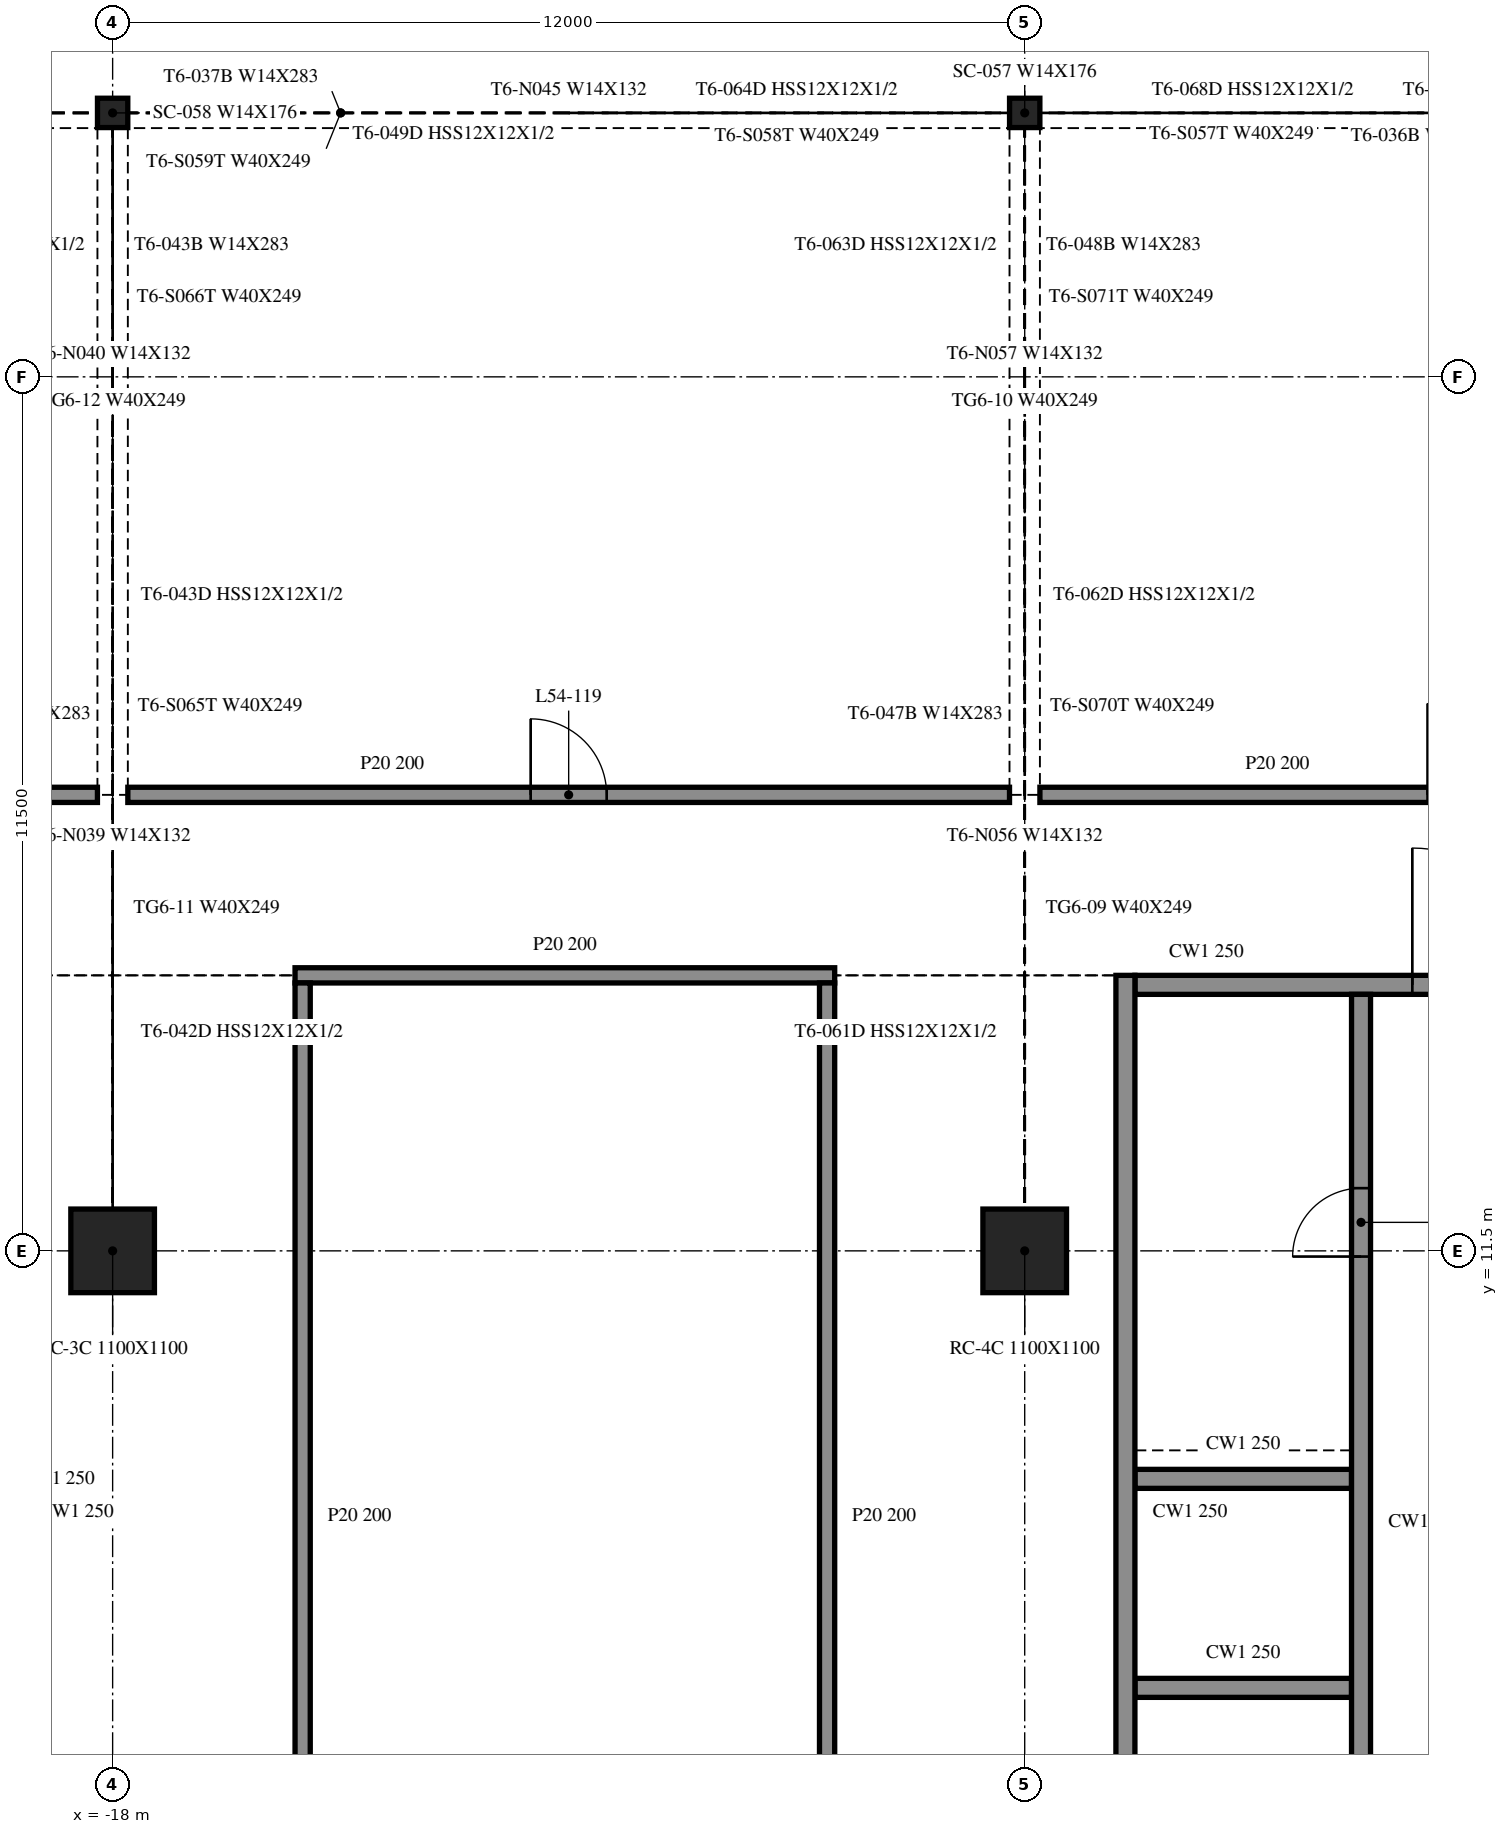
"""IFC4 building model, lengths in metres.
Left out: names, types, materials, properties, quantities, classifications, styles, units other than length and angle.
Written with IfcOpenShell. Run it as: python <this file> out.ifc"""

import sys

from ifc_helpers import new_model, si_unit, direction, frame, frame_2d, origin, origin_2d, place, context, subcontext, project, spatial, rectangle, i_section, extrude, element, fill, save


model = new_model("IFC4")
c1 = context("Model", 3, precision=1e-05, world=origin(), true_north=direction((0.0, 1.0)))
c2 = subcontext(c1, "Body", "Model", "MODEL_VIEW")
j1 = project(units=[si_unit("LENGTHUNIT", "METRE"), si_unit("PLANEANGLEUNIT", "RADIAN")], contexts=[c1])
p1 = place(None, origin())
s1 = spatial("IfcSite", under=j1, at=p1, CompositionType="ELEMENT")
p2 = place(p1, origin())
s2 = spatial("IfcBuilding", under=s1, at=p2, CompositionType="ELEMENT")
p3 = place(p2, frame((0.0, 0.0, 224.3)))
s3 = spatial("IfcBuildingStorey", under=s2, at=p3, CompositionType="ELEMENT", Elevation=224.3)
for number, where, z_axis, x_axis in (
    (1, (-18.0, 11.5, -0.4), (0.0, 0.0, 1.0), (1.0, 0.0, 0.0)),
    (2, (-6.0, 11.5, -0.4), (0.0, 0.0, 1.0), (1.0, 0.0, 0.0)),
):
    element("IfcColumn", number, at=place(p3, frame(where, z_axis=z_axis, x_axis=x_axis)), inside=s3, PredefinedType="COLUMN", context=c2, shape_type="SweptSolid", body=[
        extrude(rectangle(XDim=1.1, YDim=1.1, at=origin_2d()), origin(), (0.0, 0.0, 1.0), 4.36),
    ])
for number, where, z_axis, x_axis in (
    (3, (-6.0, 26.473, -0.4), (0.0, 0.0, 1.0), (1.0, 0.0, 0.0)),
    (4, (-18.0, 26.473, -0.4), (0.0, 0.0, 1.0), (1.0, 0.0, 0.0)),
):
    element("IfcColumn", number, at=place(p3, frame(where, z_axis=z_axis, x_axis=x_axis)), inside=s3, PredefinedType="COLUMN", context=c2, shape_type="SweptSolid", body=[
        extrude(i_section(OverallWidth=0.399, OverallDepth=0.386, WebThickness=0.021, FlangeThickness=0.033, at=origin_2d()), origin(), (0.0, 0.0, 1.0), 4.36),
    ])
p4 = place(p3, frame((-4.675, 15.125, 0.0), z_axis=(0.0, 0.0, 1.0), x_axis=(0.0, -1.0, 0.0)))
e5 = element("IfcWall", 5, at=p4, inside=s3, PredefinedType="SOLIDWALL", context=c2, shape_type="SweptSolid", body=[
    extrude(rectangle(XDim=24.25, YDim=0.25, at=frame_2d((12.125, 0.0))), origin(), (0.0, 0.0, 1.0), 3.96),
])
p5 = place(p3, frame((-4.55, 15.0, 0.0), z_axis=(0.0, 0.0, 1.0), x_axis=(1.0, 0.0, 0.0)))
e6 = element("IfcWall", 6, at=p5, inside=s3, PredefinedType="SOLIDWALL", context=c2, shape_type="SweptSolid", body=[
    extrude(rectangle(XDim=9.1, YDim=0.25, at=frame_2d((4.55, 0.0))), origin(), (0.0, 0.0, 1.0), 3.96),
])
p6 = place(p5, frame((3.65, 0.0, 0.0)))
e7 = element("IfcOpeningElement", 7, at=p6, cuts=e6, PredefinedType="OPENING", context=c2, shape_type="SweptSolid", body=[
    extrude(rectangle(XDim=1.8, YDim=2.1, at=frame_2d((0.9, 1.05))), frame((0.0, 0.135, 0.0), z_axis=(0.0, -1.0, 0.0), x_axis=(1.0, 0.0, 0.0)), (0.0, 0.0, 1.0), 0.27),
])
p7 = place(p3, frame((-1.575, -8.875, 0.0), z_axis=(0.0, 0.0, 1.0), x_axis=(0.0, 1.0, 0.0)))
e8 = element("IfcWall", 8, at=p7, inside=s3, PredefinedType="SOLIDWALL", context=c2, shape_type="SweptSolid", body=[
    extrude(rectangle(XDim=23.75, YDim=0.25, at=frame_2d((11.875, 0.0))), origin(), (0.0, 0.0, 1.0), 3.96),
])
p8 = place(p7, frame((0.712, 0.0, 0.0)))
e9 = element("IfcOpeningElement", 9, at=p8, cuts=e8, PredefinedType="OPENING", context=c2, shape_type="SweptSolid", body=[
    extrude(rectangle(XDim=0.9, YDim=2.1, at=frame_2d((0.45, 1.05))), frame((0.0, 0.135, 0.0), z_axis=(0.0, -1.0, 0.0), x_axis=(1.0, 0.0, 0.0)), (0.0, 0.0, 1.0), 0.27),
])
p9 = place(p7, frame((3.788, 0.0, 0.0)))
e10 = element("IfcOpeningElement", 10, at=p9, cuts=e8, PredefinedType="OPENING", context=c2, shape_type="SweptSolid", body=[
    extrude(rectangle(XDim=0.9, YDim=2.1, at=frame_2d((0.45, 1.05))), frame((0.0, 0.135, 0.0), z_axis=(0.0, -1.0, 0.0), x_axis=(1.0, 0.0, 0.0)), (0.0, 0.0, 1.0), 0.27),
])
p10 = place(p7, frame((20.3, 0.0, 0.0)))
e11 = element("IfcOpeningElement", 11, at=p10, cuts=e8, PredefinedType="OPENING", context=c2, shape_type="SweptSolid", body=[
    extrude(rectangle(XDim=0.9, YDim=2.1, at=frame_2d((0.45, 1.05))), frame((0.0, 0.135, 0.0), z_axis=(0.0, -1.0, 0.0), x_axis=(1.0, 0.0, 0.0)), (0.0, 0.0, 1.0), 0.27),
])
for number, where, z_axis, x_axis in (
    (12, (-4.55, 5.75, 0.0), (0.0, 0.0, 1.0), (1.0, 0.0, 0.0)),
    (13, (-4.55, 8.5, 0.0), (0.0, 0.0, 1.0), (1.0, 0.0, 0.0)),
):
    element("IfcWall", number, at=place(p3, frame(where, z_axis=z_axis, x_axis=x_axis)), inside=s3, PredefinedType="SOLIDWALL", context=c2, shape_type="SweptSolid", body=[
        extrude(rectangle(XDim=2.85, YDim=0.25, at=frame_2d((1.425, 0.0))), origin(), (0.0, 0.0, 1.0), 3.96),
    ])
p11 = place(p3, frame((-15.6, 15.125, 0.0), z_axis=(0.0, 0.0, 1.0), x_axis=(1.0, 0.0, 0.0)))
e14 = element("IfcWall", 14, at=p11, inside=s3, PredefinedType="PARTITIONING", context=c2, shape_type="SweptSolid", body=[
    extrude(rectangle(XDim=7.1, YDim=0.2, at=frame_2d((3.55, 0.0))), origin(), (0.0, 0.0, 1.0), 3.96),
])
p12 = place(p3, frame((-29.8, 17.5, 0.0), z_axis=(0.0, 0.0, 1.0), x_axis=(1.0, 0.0, 0.0)))
e15 = element("IfcWall", 15, at=p12, inside=s3, PredefinedType="PARTITIONING", context=c2, shape_type="SweptSolid", body=[
    extrude(rectangle(XDim=11.6, YDim=0.2, at=frame_2d((5.8, 0.0))), origin(), (0.0, 0.0, 1.0), 3.96),
])
p13 = place(p12, frame((5.3, 0.0, 0.0)))
e16 = element("IfcOpeningElement", 16, at=p13, cuts=e15, PredefinedType="OPENING", context=c2, shape_type="SweptSolid", body=[
    extrude(rectangle(XDim=1.0, YDim=2.1, at=frame_2d((0.5, 1.05))), frame((0.0, 0.11, 0.0), z_axis=(0.0, -1.0, 0.0), x_axis=(1.0, 0.0, 0.0)), (0.0, 0.0, 1.0), 0.22),
])
p14 = place(p3, frame((-17.8, 17.5, 0.0), z_axis=(0.0, 0.0, 1.0), x_axis=(1.0, 0.0, 0.0)))
e17 = element("IfcWall", 17, at=p14, inside=s3, PredefinedType="PARTITIONING", context=c2, shape_type="SweptSolid", body=[
    extrude(rectangle(XDim=11.6, YDim=0.2, at=frame_2d((5.8, 0.0))), origin(), (0.0, 0.0, 1.0), 3.96),
])
p15 = place(p14, frame((5.3, 0.0, 0.0)))
e18 = element("IfcOpeningElement", 18, at=p15, cuts=e17, PredefinedType="OPENING", context=c2, shape_type="SweptSolid", body=[
    extrude(rectangle(XDim=1.0, YDim=2.1, at=frame_2d((0.5, 1.05))), frame((0.0, 0.11, 0.0), z_axis=(0.0, -1.0, 0.0), x_axis=(1.0, 0.0, 0.0)), (0.0, 0.0, 1.0), 0.22),
])
p16 = place(p3, frame((-5.8, 17.5, 0.0), z_axis=(0.0, 0.0, 1.0), x_axis=(1.0, 0.0, 0.0)))
e19 = element("IfcWall", 19, at=p16, inside=s3, PredefinedType="PARTITIONING", context=c2, shape_type="SweptSolid", body=[
    extrude(rectangle(XDim=11.6, YDim=0.2, at=frame_2d((5.8, 0.0))), origin(), (0.0, 0.0, 1.0), 3.96),
])
p17 = place(p16, frame((5.1, 0.0, 0.0)))
e20 = element("IfcOpeningElement", 20, at=p17, cuts=e19, PredefinedType="OPENING", context=c2, shape_type="SweptSolid", body=[
    extrude(rectangle(XDim=1.2, YDim=2.1, at=frame_2d((0.6, 1.05))), frame((0.0, 0.11, 0.0), z_axis=(0.0, -1.0, 0.0), x_axis=(1.0, 0.0, 0.0)), (0.0, 0.0, 1.0), 0.22),
])
p18 = place(p3, frame((-15.5, -9.025, 0.0), z_axis=(0.0, 0.0, 1.0), x_axis=(0.0, 1.0, 0.0)))
e21 = element("IfcWall", 21, at=p18, inside=s3, PredefinedType="PARTITIONING", context=c2, shape_type="SweptSolid", body=[
    extrude(rectangle(XDim=24.05, YDim=0.2, at=frame_2d((12.025, 0.0))), origin(), (0.0, 0.0, 1.0), 3.96),
])
p19 = place(p18, frame((11.5, 0.0, 0.0)))
e22 = element("IfcOpeningElement", 22, at=p19, cuts=e21, PredefinedType="OPENING", context=c2, shape_type="SweptSolid", body=[
    extrude(rectangle(XDim=1.0, YDim=2.1, at=frame_2d((0.5, 1.05))), frame((0.0, 0.11, 0.0), z_axis=(0.0, -1.0, 0.0), x_axis=(1.0, 0.0, 0.0)), (0.0, 0.0, 1.0), 0.22),
])
p20 = place(p3, frame((-8.6, -9.025, 0.0), z_axis=(0.0, 0.0, 1.0), x_axis=(0.0, 1.0, 0.0)))
e23 = element("IfcWall", 23, at=p20, inside=s3, PredefinedType="PARTITIONING", context=c2, shape_type="SweptSolid", body=[
    extrude(rectangle(XDim=24.05, YDim=0.2, at=frame_2d((12.025, 0.0))), origin(), (0.0, 0.0, 1.0), 3.96),
])
p21 = place(p6, origin())
e24 = element("IfcDoor", 24, at=p21, inside=s3, OperationType="DOUBLE_DOOR_SINGLE_SWING", PredefinedType="DOOR", context=c2, shape_type="SweptSolid", body=[
    extrude(rectangle(XDim=1.8, YDim=2.1, at=frame_2d((0.9, 1.05))), frame((0.0, 0.025, 0.0), z_axis=(0.0, -1.0, 0.0), x_axis=(1.0, 0.0, 0.0)), (0.0, 0.0, 1.0), 0.05),
])
fill(e7, e24)
p22 = place(p10, origin())
e25 = element("IfcDoor", 25, at=p22, inside=s3, OperationType="SINGLE_SWING_LEFT", PredefinedType="DOOR", context=c2, shape_type="SweptSolid", body=[
    extrude(rectangle(XDim=0.9, YDim=2.1, at=frame_2d((0.45, 1.05))), frame((0.0, 0.025, 0.0), z_axis=(0.0, -1.0, 0.0), x_axis=(1.0, 0.0, 0.0)), (0.0, 0.0, 1.0), 0.05),
])
fill(e11, e25)
p23 = place(p15, origin())
e26 = element("IfcDoor", 26, at=p23, inside=s3, OperationType="SINGLE_SWING_RIGHT", PredefinedType="DOOR", context=c2, shape_type="SweptSolid", body=[
    extrude(rectangle(XDim=1.0, YDim=2.1, at=frame_2d((0.5, 1.05))), frame((0.0, 0.025, 0.0), z_axis=(0.0, -1.0, 0.0), x_axis=(1.0, 0.0, 0.0)), (0.0, 0.0, 1.0), 0.05),
])
fill(e18, e26)
save(model, sys.argv[1])
